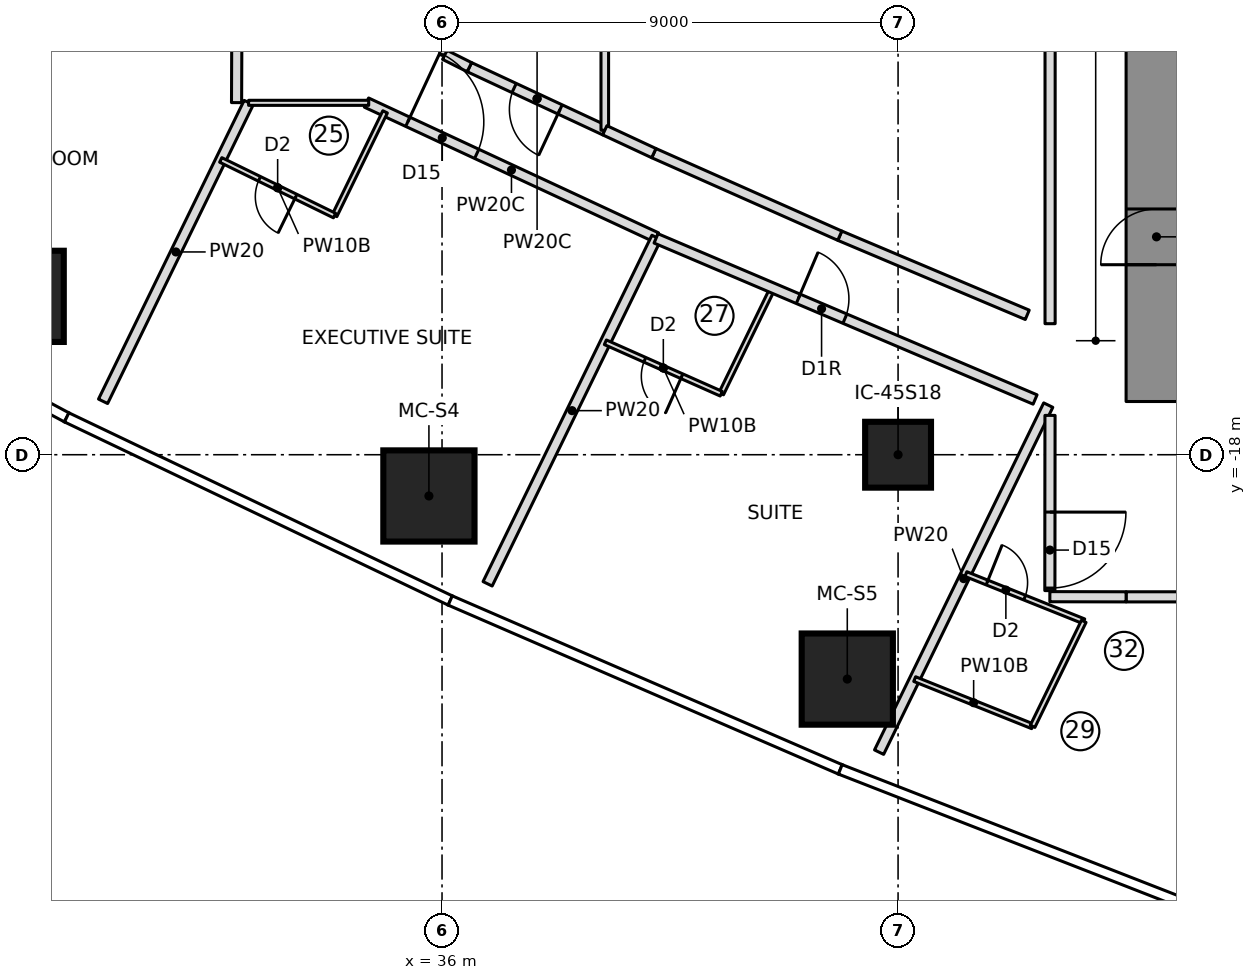
"""IFC4 building model, lengths in metres.
Left out: names, types, materials, properties, quantities, classifications, styles, units other than length and angle.
Written with IfcOpenShell. Run it as: python <this file> out.ifc"""

import sys

from ifc_helpers import new_model, si_unit, direction, frame, frame_2d, origin, origin_2d, place, context, subcontext, project, spatial, rectangle, extrude, element, fill, save


model = new_model("IFC4")
c1 = context("Model", 3, precision=1e-05, world=origin(), true_north=direction((0.0, 1.0)))
c2 = subcontext(c1, "Body", "Model", "MODEL_VIEW")
j1 = project(units=[si_unit("LENGTHUNIT", "METRE"), si_unit("PLANEANGLEUNIT", "RADIAN")], contexts=[c1])
p1 = place(None, origin())
s1 = spatial("IfcSite", under=j1, at=p1, CompositionType="ELEMENT")
p2 = place(p1, origin())
s2 = spatial("IfcBuilding", under=s1, at=p2, CompositionType="ELEMENT")
p3 = place(p2, frame((0.0, 0.0, 50.25)))
s3 = spatial("IfcBuildingStorey", under=s2, at=p3, CompositionType="ELEMENT", Elevation=50.25)
p4 = place(p3, frame((50.1, -16.95, 0.0), z_axis=(0.0, 0.0, 1.0), x_axis=(0.0, 1.0, 0.0)))
e1 = element("IfcWall", 1, at=p4, inside=s3, PredefinedType="SHEAR", context=c2, shape_type="SweptSolid", body=[
    extrude(rectangle(XDim=10.3, YDim=1.2, at=frame_2d((5.15, 0.0))), origin(), (0.0, 0.0, 1.0), 3.55),
])
p5 = place(p4, frame((2.7, 0.0, 0.0)))
e2 = element("IfcOpeningElement", 2, at=p5, cuts=e1, PredefinedType="OPENING", context=c2, shape_type="SweptSolid", body=[
    extrude(rectangle(XDim=1.1, YDim=2.1, at=frame_2d((0.55, 1.05))), frame((0.0, 0.61, 0.0), z_axis=(0.0, -1.0, 0.0), x_axis=(1.0, 0.0, 0.0)), (0.0, 0.0, 1.0), 1.22),
])
for number, where, z_axis, x_axis in (
    (3, (27.635, -14.874, 0.0), (0.0, 0.0, 1.0), (1.0, 0.0, 0.0)),
    (4, (35.741, -18.814, 0.0), (0.0, 0.0, 1.0), (1.0, 0.0, 0.0)),
    (5, (43.998, -22.428, 0.0), (0.0, 0.0, 1.0), (1.0, 0.0, 0.0)),
):
    element("IfcColumn", number, at=place(p3, frame(where, z_axis=z_axis, x_axis=x_axis)), inside=s3, PredefinedType="COLUMN", context=c2, shape_type="SweptSolid", body=[
        extrude(rectangle(XDim=1.8, YDim=1.8, at=origin_2d()), origin(), (0.0, 0.0, 1.0), 3.55),
    ])
p6 = place(p3, frame((45.0, -18.0, 0.0), z_axis=(0.0, 0.0, 1.0), x_axis=(1.0, 0.0, 0.0)))
e6 = element("IfcColumn", 6, at=p6, inside=s3, PredefinedType="COLUMN", context=c2, shape_type="SweptSolid", body=[
    extrude(rectangle(XDim=1.3, YDim=1.3, at=origin_2d()), origin(), (0.0, 0.0, 1.0), 3.55),
])
p7 = place(p3, frame((29.31, -16.946, 0.0), z_axis=(0.0, 0.0, 1.0), x_axis=(0.438228560869, 0.898863576099, 0.0)))
e7 = element("IfcWall", 7, at=p7, inside=s3, PredefinedType="PARTITIONING", context=c2, shape_type="SweptSolid", body=[
    extrude(rectangle(XDim=6.559, YDim=0.2, at=frame_2d((3.28, 0.0))), origin(), (0.0, 0.0, 1.0), 3.25),
])
p8 = place(p3, frame((34.509, -11.05, 0.0), z_axis=(0.0, 0.0, 1.0), x_axis=(0.906710104698, -0.421754414368, 0.0)))
e8 = element("IfcWall", 8, at=p8, inside=s3, PredefinedType="PARTITIONING", context=c2, shape_type="SweptSolid", body=[
    extrude(rectangle(XDim=6.312, YDim=0.2, at=frame_2d((3.156, 0.0))), origin(), (0.0, 0.0, 1.0), 3.25),
])
p9 = place(p8, frame((0.9, 0.0, 0.0)))
e9 = element("IfcOpeningElement", 9, at=p9, cuts=e8, PredefinedType="OPENING", context=c2, shape_type="SweptSolid", body=[
    extrude(rectangle(XDim=1.5, YDim=2.1, at=frame_2d((0.75, 1.05))), frame((0.0, 0.11, 0.0), z_axis=(0.0, -1.0, 0.0), x_axis=(1.0, 0.0, 0.0)), (0.0, 0.0, 1.0), 0.22),
])
p10 = place(p3, frame((34.877, -11.233, 0.0), z_axis=(0.0, 0.0, 1.0), x_axis=(-0.438227154656, -0.898864261678, 0.0)))
e10 = element("IfcWall", 10, at=p10, inside=s3, PredefinedType="PARTITIONING", context=c2, shape_type="SweptSolid", body=[
    extrude(rectangle(XDim=2.277, YDim=0.1, at=frame_2d((1.138, 0.0))), origin(), (0.0, 0.0, 1.0), 3.25),
])
p11 = place(p3, frame((33.879, -13.28, 0.0), z_axis=(0.0, 0.0, 1.0), x_axis=(-0.89845285455, 0.439070003702, 0.0)))
e11 = element("IfcWall", 11, at=p11, inside=s3, PredefinedType="PARTITIONING", context=c2, shape_type="SweptSolid", body=[
    extrude(rectangle(XDim=2.5, YDim=0.1, at=frame_2d((1.25, 0.0))), origin(), (0.0, 0.0, 1.0), 3.25),
])
p12 = place(p11, frame((0.85, 0.0, 0.0)))
e12 = element("IfcOpeningElement", 12, at=p12, cuts=e11, PredefinedType="OPENING", context=c2, shape_type="SweptSolid", body=[
    extrude(rectangle(XDim=0.8, YDim=2.1, at=frame_2d((0.4, 1.05))), frame((0.0, 0.06, 0.0), z_axis=(0.0, -1.0, 0.0), x_axis=(1.0, 0.0, 0.0)), (0.0, 0.0, 1.0), 0.12),
])
p13 = place(p3, frame((36.899, -20.548, 0.0), z_axis=(0.0, 0.0, 1.0), x_axis=(0.438202247191, 0.898876404494, 0.0)))
e13 = element("IfcWall", 13, at=p13, inside=s3, PredefinedType="PARTITIONING", context=c2, shape_type="SweptSolid", body=[
    extrude(rectangle(XDim=7.605, YDim=0.2, at=frame_2d((3.802, 0.0))), origin(), (0.0, 0.0, 1.0), 3.25),
])
p14 = place(p3, frame((42.508, -14.748, 0.0), z_axis=(0.0, 0.0, 1.0), x_axis=(-0.4381470535, -0.898903309321, 0.0)))
e14 = element("IfcWall", 14, at=p14, inside=s3, PredefinedType="PARTITIONING", context=c2, shape_type="SweptSolid", body=[
    extrude(rectangle(XDim=2.278, YDim=0.1, at=frame_2d((1.139, 0.0))), origin(), (0.0, 0.0, 1.0), 3.25),
])
p15 = place(p3, frame((41.51, -16.796, 0.0), z_axis=(0.0, 0.0, 1.0), x_axis=(-0.914000607553, 0.405712816401, 0.0)))
e15 = element("IfcWall", 15, at=p15, inside=s3, PredefinedType="PARTITIONING", context=c2, shape_type="SweptSolid", body=[
    extrude(rectangle(XDim=2.501, YDim=0.1, at=frame_2d((1.251, 0.0))), origin(), (0.0, 0.0, 1.0), 3.25),
])
p16 = place(p15, frame((0.85, 0.0, 0.0)))
e16 = element("IfcOpeningElement", 16, at=p16, cuts=e15, PredefinedType="OPENING", context=c2, shape_type="SweptSolid", body=[
    extrude(rectangle(XDim=0.8, YDim=2.1, at=frame_2d((0.4, 1.05))), frame((0.0, 0.06, 0.0), z_axis=(0.0, -1.0, 0.0), x_axis=(1.0, 0.0, 0.0)), (0.0, 0.0, 1.0), 0.12),
])
p17 = place(p3, frame((44.625, -23.87, 0.0), z_axis=(0.0, 0.0, 1.0), x_axis=(0.438207101073, 0.898874038211, 0.0)))
e17 = element("IfcWall", 17, at=p17, inside=s3, PredefinedType="PARTITIONING", context=c2, shape_type="SweptSolid", body=[
    extrude(rectangle(XDim=7.62, YDim=0.2, at=frame_2d((3.81, 0.0))), origin(), (0.0, 0.0, 1.0), 3.25),
])
p18 = place(p3, frame((47.655, -23.361, 0.0), z_axis=(0.0, 0.0, 1.0), x_axis=(-0.928288495333, 0.371860819975, 0.0)))
e18 = element("IfcWall", 18, at=p18, inside=s3, PredefinedType="PARTITIONING", context=c2, shape_type="SweptSolid", body=[
    extrude(rectangle(XDim=2.507, YDim=0.1, at=frame_2d((1.253, 0.0))), origin(), (0.0, 0.0, 1.0), 3.25),
])
p19 = place(p3, frame((46.338, -20.355, 0.0), z_axis=(0.0, 0.0, 1.0), x_axis=(0.928288495333, -0.371860819975, 0.0)))
e19 = element("IfcWall", 19, at=p19, inside=s3, PredefinedType="PARTITIONING", context=c2, shape_type="SweptSolid", body=[
    extrude(rectangle(XDim=2.507, YDim=0.1, at=frame_2d((1.253, 0.0))), origin(), (0.0, 0.0, 1.0), 3.25),
])
p20 = place(p19, frame((0.45, 0.0, 0.0)))
e20 = element("IfcOpeningElement", 20, at=p20, cuts=e19, PredefinedType="OPENING", context=c2, shape_type="SweptSolid", body=[
    extrude(rectangle(XDim=0.8, YDim=2.1, at=frame_2d((0.4, 1.05))), frame((0.0, 0.06, 0.0), z_axis=(0.0, -1.0, 0.0), x_axis=(1.0, 0.0, 0.0)), (0.0, 0.0, 1.0), 0.12),
])
p21 = place(p3, frame((48.665, -21.288, 0.0), z_axis=(0.0, 0.0, 1.0), x_axis=(-0.438171240168, -0.898891519756, 0.0)))
e21 = element("IfcWall", 21, at=p21, inside=s3, PredefinedType="PARTITIONING", context=c2, shape_type="SweptSolid", body=[
    extrude(rectangle(XDim=2.306, YDim=0.1, at=frame_2d((1.153, 0.0))), origin(), (0.0, 0.0, 1.0), 3.25),
])
p22 = place(p3, frame((39.212, -11.597, 0.0), z_axis=(0.0, 0.0, 1.0), x_axis=(-0.906348100281, 0.422531798943, 0.0)))
e22 = element("IfcWall", 22, at=p22, inside=s3, PredefinedType="PARTITIONING", context=c2, shape_type="SweptSolid", body=[
    extrude(rectangle(XDim=2.948, YDim=0.2, at=frame_2d((1.474, 0.0))), origin(), (0.0, 0.0, 1.0), 3.25),
])
p23 = place(p22, frame((0.974, 0.0, 0.0)))
e23 = element("IfcOpeningElement", 23, at=p23, cuts=e22, PredefinedType="OPENING", context=c2, shape_type="SweptSolid", body=[
    extrude(rectangle(XDim=1.0, YDim=2.1, at=frame_2d((0.5, 1.05))), frame((0.0, 0.11, 0.0), z_axis=(0.0, -1.0, 0.0), x_axis=(1.0, 0.0, 0.0)), (0.0, 0.0, 1.0), 0.22),
])
p24 = place(p3, frame((39.212, -11.597, 0.0), z_axis=(0.0, 0.0, 1.0), x_axis=(0.0, 1.0, 0.0)))
e24 = element("IfcWall", 24, at=p24, inside=s3, PredefinedType="PARTITIONING", context=c2, shape_type="SweptSolid", body=[
    extrude(rectangle(XDim=23.193, YDim=0.15, at=frame_2d((11.597, 0.0))), origin(), (0.0, 0.0, 1.0), 3.25),
])
p25 = place(p3, frame((47.55, -15.239, 0.0), z_axis=(0.0, 0.0, 1.0), x_axis=(-0.921269894054, 0.388923877269, 0.0)))
e25 = element("IfcWall", 25, at=p25, inside=s3, PredefinedType="PARTITIONING", context=c2, shape_type="SweptSolid", body=[
    extrude(rectangle(XDim=4.016, YDim=0.2, at=frame_2d((2.008, 0.0))), origin(), (0.0, 0.0, 1.0), 3.25),
])
p26 = place(p3, frame((43.85, -13.677, 0.0), z_axis=(0.0, 0.0, 1.0), x_axis=(-0.913986953061, 0.405743576209, 0.0)))
e26 = element("IfcWall", 26, at=p26, inside=s3, PredefinedType="PARTITIONING", context=c2, shape_type="SweptSolid", body=[
    extrude(rectangle(XDim=4.016, YDim=0.2, at=frame_2d((2.008, 0.0))), origin(), (0.0, 0.0, 1.0), 3.25),
])
p27 = place(p3, frame((40.18, -12.048, 0.0), z_axis=(0.0, 0.0, 1.0), x_axis=(-0.906346628109, 0.422534956797, 0.0)))
e27 = element("IfcWall", 27, at=p27, inside=s3, PredefinedType="PARTITIONING", context=c2, shape_type="SweptSolid", body=[
    extrude(rectangle(XDim=1.068, YDim=0.2, at=frame_2d((0.534, 0.0))), origin(), (0.0, 0.0, 1.0), 3.25),
])
p28 = place(p3, frame((49.5, -20.805, 0.0), z_axis=(0.0, 0.0, 1.0), x_axis=(1.0, 0.0, 0.0)))
e28 = element("IfcWall", 28, at=p28, inside=s3, PredefinedType="PARTITIONING", context=c2, shape_type="SweptSolid", body=[
    extrude(rectangle(XDim=5.097, YDim=0.2, at=frame_2d((2.548, 0.0))), origin(), (0.0, 0.0, 1.0), 3.25),
])
p29 = place(p28, frame((2.048, 0.0, 0.0)))
e29 = element("IfcOpeningElement", 29, at=p29, cuts=e28, PredefinedType="OPENING", context=c2, shape_type="SweptSolid", body=[
    extrude(rectangle(XDim=1.5, YDim=2.1, at=frame_2d((0.75, 1.05))), frame((0.0, 0.11, 0.0), z_axis=(0.0, -1.0, 0.0), x_axis=(1.0, 0.0, 0.0)), (0.0, 0.0, 1.0), 0.22),
])
p30 = place(p3, frame((32.182, -11.055, 0.0), z_axis=(0.0, 0.0, 1.0), x_axis=(1.0, 0.0, 0.0)))
e30 = element("IfcWall", 30, at=p30, inside=s3, PredefinedType="PARTITIONING", context=c2, shape_type="SweptSolid", body=[
    extrude(rectangle(XDim=2.371, YDim=0.1, at=frame_2d((1.186, 0.0))), origin(), (0.0, 0.0, 1.0), 3.25),
])
p31 = place(p3, frame((40.223, -13.73, 0.0), z_axis=(0.0, 0.0, 1.0), x_axis=(0.920292261621, -0.391231585127, 0.0)))
e31 = element("IfcWall", 31, at=p31, inside=s3, PredefinedType="PARTITIONING", context=c2, shape_type="SweptSolid", body=[
    extrude(rectangle(XDim=8.129, YDim=0.2, at=frame_2d((4.064, 0.0))), origin(), (0.0, 0.0, 1.0), 3.25),
])
p32 = place(p31, frame((3.05, 0.0, 0.0)))
e32 = element("IfcOpeningElement", 32, at=p32, cuts=e31, PredefinedType="OPENING", context=c2, shape_type="SweptSolid", body=[
    extrude(rectangle(XDim=1.0, YDim=2.1, at=frame_2d((0.5, 1.05))), frame((0.0, 0.11, 0.0), z_axis=(0.0, -1.0, 0.0), x_axis=(1.0, 0.0, 0.0)), (0.0, 0.0, 1.0), 0.22),
])
p33 = place(p3, frame((36.055, -10.108, 0.0), z_axis=(0.0, 0.0, 1.0), x_axis=(-0.000540415269, 0.999999853976, 0.0)))
e33 = element("IfcWall", 33, at=p33, inside=s3, PredefinedType="PARTITIONING", context=c2, shape_type="SweptSolid", body=[
    extrude(rectangle(XDim=3.162, YDim=0.2, at=frame_2d((1.581, 0.0))), origin(), (0.0, 0.0, 1.0), 3.25),
])
p34 = place(p3, frame((48.0, 15.414, 0.0), z_axis=(0.0, 0.0, 1.0), x_axis=(0.0, -1.0, 0.0)))
e34 = element("IfcWall", 34, at=p34, inside=s3, PredefinedType="PARTITIONING", context=c2, shape_type="SweptSolid", body=[
    extrude(rectangle(XDim=30.828, YDim=0.2, at=frame_2d((15.414, 0.0))), origin(), (0.0, 0.0, 1.0), 3.25),
])
p35 = place(p3, frame((31.95, -9.77, 0.0), z_axis=(0.0, 0.0, 1.0), x_axis=(-0.003811674235, -0.999992735543, 0.0)))
e35 = element("IfcWall", 35, at=p35, inside=s3, PredefinedType="PARTITIONING", context=c2, shape_type="SweptSolid", body=[
    extrude(rectangle(XDim=1.281, YDim=0.2, at=frame_2d((0.641, 0.0))), origin(), (0.0, 0.0, 1.0), 3.25),
])
p36 = place(p3, frame((47.995, -20.802, 0.0), z_axis=(0.0, 0.0, 1.0), x_axis=(0.999998104399, -0.001947099992, 0.0)))
e36 = element("IfcWall", 36, at=p36, inside=s3, PredefinedType="PARTITIONING", context=c2, shape_type="SweptSolid", body=[
    extrude(rectangle(XDim=1.505, YDim=0.2, at=frame_2d((0.752, 0.0))), origin(), (0.0, 0.0, 1.0), 3.25),
])
p37 = place(p3, frame((36.54, -10.351, 0.0), z_axis=(0.0, 0.0, 1.0), x_axis=(-0.894337154042, 0.447393624116, 0.0)))
e37 = element("IfcWall", 37, at=p37, inside=s3, PredefinedType="PARTITIONING", context=c2, shape_type="SweptSolid", body=[
    extrude(rectangle(XDim=0.542, YDim=0.2, at=frame_2d((0.271, 0.0))), origin(), (0.0, 0.0, 1.0), 3.25),
])
p38 = place(p3, frame((47.999, -17.224, 0.0), z_axis=(0.0, 0.0, 1.0), x_axis=(-0.000847217996, -0.999999641111, 0.0)))
e38 = element("IfcWall", 38, at=p38, inside=s3, PredefinedType="PARTITIONING", context=c2, shape_type="SweptSolid", body=[
    extrude(rectangle(XDim=3.458, YDim=0.2, at=frame_2d((1.729, 0.0))), origin(), (0.0, 0.0, 1.0), 3.25),
])
p39 = place(p38, frame((1.908, 0.0, 0.0)))
e39 = element("IfcOpeningElement", 39, at=p39, cuts=e38, PredefinedType="OPENING", context=c2, shape_type="SweptSolid", body=[
    extrude(rectangle(XDim=1.5, YDim=2.1, at=frame_2d((0.75, 1.05))), frame((0.0, 0.11, 0.0), z_axis=(0.0, -1.0, 0.0), x_axis=(1.0, 0.0, 0.0)), (0.0, 0.0, 1.0), 0.22),
])
p40 = place(p12, origin())
e40 = element("IfcDoor", 40, at=p40, inside=s3, OperationType="SINGLE_SWING_LEFT", PredefinedType="DOOR", context=c2, shape_type="SweptSolid", body=[
    extrude(rectangle(XDim=0.8, YDim=2.1, at=frame_2d((0.4, 1.05))), frame((0.0, 0.025, 0.0), z_axis=(0.0, -1.0, 0.0), x_axis=(1.0, 0.0, 0.0)), (0.0, 0.0, 1.0), 0.05),
])
fill(e12, e40)
p41 = place(p9, origin())
e41 = element("IfcDoor", 41, at=p41, inside=s3, OperationType="DOUBLE_DOOR_SINGLE_SWING", PredefinedType="DOOR", context=c2, shape_type="SweptSolid", body=[
    extrude(rectangle(XDim=1.5, YDim=2.1, at=frame_2d((0.75, 1.05))), frame((0.0, 0.025, 0.0), z_axis=(0.0, -1.0, 0.0), x_axis=(1.0, 0.0, 0.0)), (0.0, 0.0, 1.0), 0.05),
])
fill(e9, e41)
p42 = place(p16, origin())
e42 = element("IfcDoor", 42, at=p42, inside=s3, OperationType="SINGLE_SWING_LEFT", PredefinedType="DOOR", context=c2, shape_type="SweptSolid", body=[
    extrude(rectangle(XDim=0.8, YDim=2.1, at=frame_2d((0.4, 1.05))), frame((0.0, 0.025, 0.0), z_axis=(0.0, -1.0, 0.0), x_axis=(1.0, 0.0, 0.0)), (0.0, 0.0, 1.0), 0.05),
])
fill(e16, e42)
p43 = place(p32, origin())
e43 = element("IfcDoor", 43, at=p43, inside=s3, OperationType="SINGLE_SWING_RIGHT", PredefinedType="DOOR", context=c2, shape_type="SweptSolid", body=[
    extrude(rectangle(XDim=1.0, YDim=2.1, at=frame_2d((0.5, 1.05))), frame((0.0, 0.025, 0.0), z_axis=(0.0, -1.0, 0.0), x_axis=(1.0, 0.0, 0.0)), (0.0, 0.0, 1.0), 0.05),
])
fill(e32, e43)
p44 = place(p20, origin())
e44 = element("IfcDoor", 44, at=p44, inside=s3, OperationType="SINGLE_SWING_LEFT", PredefinedType="DOOR", context=c2, shape_type="SweptSolid", body=[
    extrude(rectangle(XDim=0.8, YDim=2.1, at=frame_2d((0.4, 1.05))), frame((0.0, 0.025, 0.0), z_axis=(0.0, -1.0, 0.0), x_axis=(1.0, 0.0, 0.0)), (0.0, 0.0, 1.0), 0.05),
])
fill(e20, e44)
p45 = place(p23, origin())
e45 = element("IfcDoor", 45, at=p45, inside=s3, OperationType="SINGLE_SWING_RIGHT", PredefinedType="DOOR", context=c2, shape_type="SweptSolid", body=[
    extrude(rectangle(XDim=1.0, YDim=2.1, at=frame_2d((0.5, 1.05))), frame((0.0, 0.025, 0.0), z_axis=(0.0, -1.0, 0.0), x_axis=(1.0, 0.0, 0.0)), (0.0, 0.0, 1.0), 0.05),
])
fill(e23, e45)
p46 = place(p39, origin())
e46 = element("IfcDoor", 46, at=p46, inside=s3, OperationType="DOUBLE_DOOR_SINGLE_SWING", PredefinedType="DOOR", context=c2, shape_type="SweptSolid", body=[
    extrude(rectangle(XDim=1.5, YDim=2.1, at=frame_2d((0.75, 1.05))), frame((0.0, 0.025, 0.0), z_axis=(0.0, -1.0, 0.0), x_axis=(1.0, 0.0, 0.0)), (0.0, 0.0, 1.0), 0.05),
])
fill(e39, e46)
p47 = place(p5, origin())
e47 = element("IfcDoor", 47, at=p47, inside=s3, OperationType="SINGLE_SWING_RIGHT", PredefinedType="DOOR", context=c2, shape_type="SweptSolid", body=[
    extrude(rectangle(XDim=1.1, YDim=2.1, at=frame_2d((0.55, 1.05))), frame((0.0, 0.025, 0.0), z_axis=(0.0, -1.0, 0.0), x_axis=(1.0, 0.0, 0.0)), (0.0, 0.0, 1.0), 0.05),
])
fill(e2, e47)
save(model, sys.argv[1])
